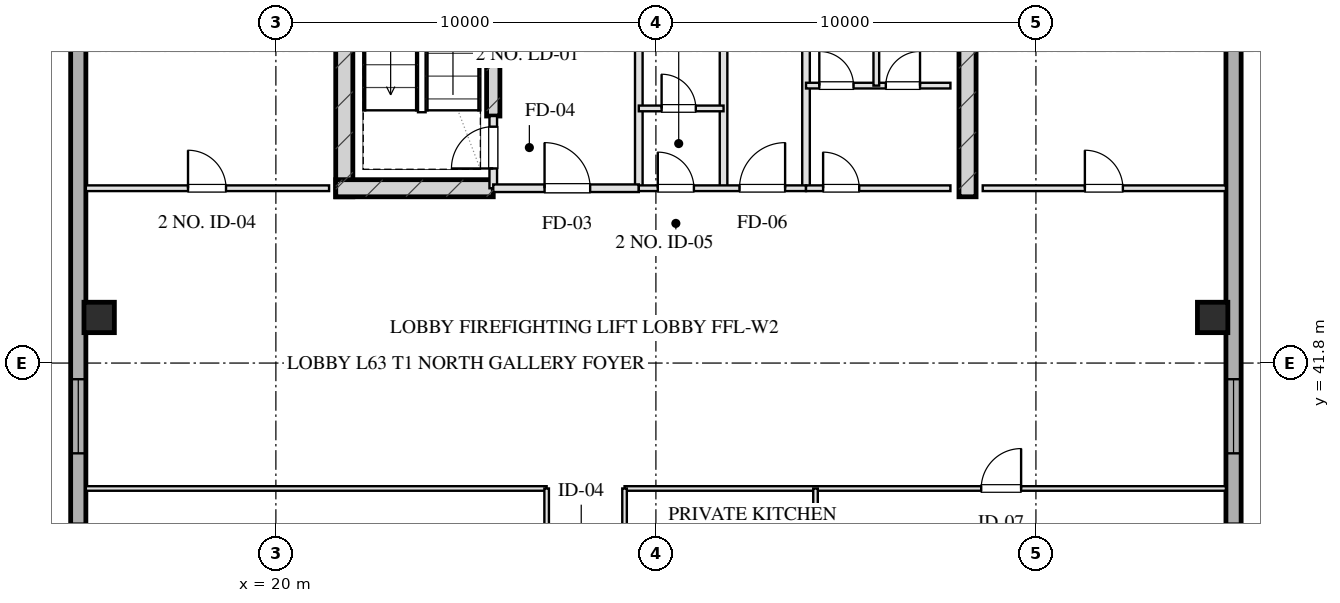
"""IFC4 building model, lengths in metres.
Left out: names, types, materials, properties, quantities, classifications, styles, units other than length and angle.
Written with IfcOpenShell. Run it as: python <this file> out.ifc"""

import sys

from ifc_helpers import new_model, si_unit, direction, frame, frame_2d, origin, origin_2d, place, context, subcontext, project, spatial, rectangle, hollow_rectangle, extrude, element, fill, save


model = new_model("IFC4")
c1 = context("Model", 3, precision=1e-05, world=origin(), true_north=direction((0.0, 1.0)))
c2 = subcontext(c1, "Body", "Model", "MODEL_VIEW")
j1 = project(units=[si_unit("LENGTHUNIT", "METRE"), si_unit("PLANEANGLEUNIT", "RADIAN")], contexts=[c1])
p1 = place(None, origin())
s1 = spatial("IfcSite", under=j1, at=p1, CompositionType="ELEMENT")
p2 = place(p1, origin())
s2 = spatial("IfcBuilding", under=s1, at=p2, CompositionType="ELEMENT")
p3 = place(p2, frame((0.0, 0.0, 234.4)))
s3 = spatial("IfcBuildingStorey", under=s2, at=p3, CompositionType="ELEMENT", Elevation=234.4)
for number, where, z_axis, x_axis in (
    (1, (21.8, 46.175, 0.0), (0.0, 0.0, 1.0), (0.0, 1.0, 0.0)),
    (2, (38.2, 46.175, 0.0), (0.0, 0.0, 1.0), (0.0, 1.0, 0.0)),
):
    element("IfcWall", number, at=place(p3, frame(where, z_axis=z_axis, x_axis=x_axis)), inside=s3, PredefinedType="SHEAR", context=c2, shape_type="SweptSolid", body=[
        extrude(rectangle(XDim=9.33, YDim=0.45, at=frame_2d((4.665, 0.0))), origin(), (0.0, 0.0, 1.0), 3.2),
    ])
p4 = place(p3, frame((25.72, 48.3, 0.0), z_axis=(0.0, 0.0, 1.0), x_axis=(0.0, 1.0, 0.0)))
e3 = element("IfcWall", 3, at=p4, inside=s3, PredefinedType="SHEAR", context=c2, shape_type="SweptSolid", body=[
    extrude(rectangle(XDim=6.98, YDim=0.35, at=frame_2d((3.49, 0.0))), origin(), (0.0, 0.0, 1.0), 3.2),
])
p5 = place(p3, frame((21.575, 46.4, 0.0), z_axis=(0.0, 0.0, 1.0), x_axis=(1.0, 0.0, 0.0)))
e4 = element("IfcWall", 4, at=p5, inside=s3, PredefinedType="SHEAR", context=c2, shape_type="SweptSolid", body=[
    extrude(rectangle(XDim=4.145, YDim=0.45, at=frame_2d((2.073, 0.0))), origin(), (0.0, 0.0, 1.0), 3.2),
])
for number, where, z_axis, x_axis in (
    (5, (15.35, 43.0, 0.0), (0.0, 0.0, 1.0), (1.0, 0.0, 0.0)),
    (6, (44.65, 43.0, 0.0), (0.0, 0.0, 1.0), (1.0, 0.0, 0.0)),
):
    element("IfcColumn", number, at=place(p3, frame(where, z_axis=z_axis, x_axis=x_axis)), inside=s3, PredefinedType="COLUMN", context=c2, shape_type="SweptSolid", body=[
        extrude(hollow_rectangle(XDim=0.8, YDim=0.8, WallThickness=0.028, at=origin_2d()), origin(), (0.0, 0.0, 1.0), 3.201),
    ])
p6 = place(p3, frame((14.8, 13.1, 0.0), z_axis=(0.0, 0.0, 1.0), x_axis=(0.0, 1.0, 0.0)))
e7 = element("IfcWall", 7, at=p6, inside=s3, PredefinedType="SOLIDWALL", context=c2, shape_type="SweptSolid", body=[
    extrude(rectangle(XDim=41.8, YDim=0.4, at=frame_2d((20.9, 0.0))), origin(), (0.0, 0.0, 1.0), 2.36),
])
p7 = place(p6, frame((13.525, 0.0, 0.75)))
e8 = element("IfcOpeningElement", 8, at=p7, cuts=e7, PredefinedType="OPENING", context=c2, shape_type="SweptSolid", body=[
    extrude(rectangle(XDim=1.95, YDim=1.21, at=frame_2d((0.975, 0.605))), frame((0.0, 0.21, 0.0), z_axis=(0.0, -1.0, 0.0), x_axis=(1.0, 0.0, 0.0)), (0.0, 0.0, 1.0), 0.42),
])
p8 = place(p6, frame((17.325, 0.0, 0.75)))
e9 = element("IfcOpeningElement", 9, at=p8, cuts=e7, PredefinedType="OPENING", context=c2, shape_type="SweptSolid", body=[
    extrude(rectangle(XDim=1.95, YDim=1.21, at=frame_2d((0.975, 0.605))), frame((0.0, 0.21, 0.0), z_axis=(0.0, -1.0, 0.0), x_axis=(1.0, 0.0, 0.0)), (0.0, 0.0, 1.0), 0.42),
])
p9 = place(p6, frame((22.525, 0.0, 0.75)))
e10 = element("IfcOpeningElement", 10, at=p9, cuts=e7, PredefinedType="OPENING", context=c2, shape_type="SweptSolid", body=[
    extrude(rectangle(XDim=1.95, YDim=1.21, at=frame_2d((0.975, 0.605))), frame((0.0, 0.21, 0.0), z_axis=(0.0, -1.0, 0.0), x_axis=(1.0, 0.0, 0.0)), (0.0, 0.0, 1.0), 0.42),
])
p10 = place(p6, frame((26.325, 0.0, 0.75)))
e11 = element("IfcOpeningElement", 11, at=p10, cuts=e7, PredefinedType="OPENING", context=c2, shape_type="SweptSolid", body=[
    extrude(rectangle(XDim=1.95, YDim=1.21, at=frame_2d((0.975, 0.605))), frame((0.0, 0.21, 0.0), z_axis=(0.0, -1.0, 0.0), x_axis=(1.0, 0.0, 0.0)), (0.0, 0.0, 1.0), 0.42),
])
p11 = place(p3, frame((45.2, 54.9, 0.0), z_axis=(0.0, 0.0, 1.0), x_axis=(0.0, -1.0, 0.0)))
e12 = element("IfcWall", 12, at=p11, inside=s3, PredefinedType="SOLIDWALL", context=c2, shape_type="SweptSolid", body=[
    extrude(rectangle(XDim=41.8, YDim=0.4, at=frame_2d((20.9, 0.0))), origin(), (0.0, 0.0, 1.0), 2.36),
])
p12 = place(p11, frame((26.325, 0.0, 0.75)))
e13 = element("IfcOpeningElement", 13, at=p12, cuts=e12, PredefinedType="OPENING", context=c2, shape_type="SweptSolid", body=[
    extrude(rectangle(XDim=1.95, YDim=1.21, at=frame_2d((0.975, 0.605))), frame((0.0, 0.21, 0.0), z_axis=(0.0, -1.0, 0.0), x_axis=(1.0, 0.0, 0.0)), (0.0, 0.0, 1.0), 0.42),
])
p13 = place(p11, frame((22.525, 0.0, 0.75)))
e14 = element("IfcOpeningElement", 14, at=p13, cuts=e12, PredefinedType="OPENING", context=c2, shape_type="SweptSolid", body=[
    extrude(rectangle(XDim=1.95, YDim=1.21, at=frame_2d((0.975, 0.605))), frame((0.0, 0.21, 0.0), z_axis=(0.0, -1.0, 0.0), x_axis=(1.0, 0.0, 0.0)), (0.0, 0.0, 1.0), 0.42),
])
p14 = place(p11, frame((17.325, 0.0, 0.75)))
e15 = element("IfcOpeningElement", 15, at=p14, cuts=e12, PredefinedType="OPENING", context=c2, shape_type="SweptSolid", body=[
    extrude(rectangle(XDim=1.95, YDim=1.21, at=frame_2d((0.975, 0.605))), frame((0.0, 0.21, 0.0), z_axis=(0.0, -1.0, 0.0), x_axis=(1.0, 0.0, 0.0)), (0.0, 0.0, 1.0), 0.42),
])
p15 = place(p11, frame((13.525, 0.0, 0.75)))
e16 = element("IfcOpeningElement", 16, at=p15, cuts=e12, PredefinedType="OPENING", context=c2, shape_type="SweptSolid", body=[
    extrude(rectangle(XDim=1.95, YDim=1.21, at=frame_2d((0.975, 0.605))), frame((0.0, 0.21, 0.0), z_axis=(0.0, -1.0, 0.0), x_axis=(1.0, 0.0, 0.0)), (0.0, 0.0, 1.0), 0.42),
])
p16 = place(p3, frame((25.72, 46.4, 0.0), z_axis=(0.0, 0.0, 1.0), x_axis=(0.0, 1.0, 0.0)))
e17 = element("IfcWall", 17, at=p16, inside=s3, PredefinedType="PARTITIONING", context=c2, shape_type="SweptSolid", body=[
    extrude(rectangle(XDim=1.9, YDim=0.2, at=frame_2d((0.95, 0.0))), origin(), (0.0, 0.0, 1.0), 2.925),
])
p17 = place(p16, frame((0.52, 0.0, 0.0)))
e18 = element("IfcOpeningElement", 18, at=p17, cuts=e17, PredefinedType="OPENING", context=c2, shape_type="SweptSolid", body=[
    extrude(rectangle(XDim=1.1, YDim=2.05, at=frame_2d((0.55, 1.025))), frame((0.0, 0.11, 0.0), z_axis=(0.0, -1.0, 0.0), x_axis=(1.0, 0.0, 0.0)), (0.0, 0.0, 1.0), 0.22),
])
p18 = place(p3, frame((29.55, 46.4, 0.0), z_axis=(0.0, 0.0, 1.0), x_axis=(0.0, 1.0, 0.0)))
e19 = element("IfcWall", 19, at=p18, inside=s3, PredefinedType="PARTITIONING", context=c2, shape_type="SweptSolid", body=[
    extrude(rectangle(XDim=8.43, YDim=0.2, at=frame_2d((4.215, 0.0))), origin(), (0.0, 0.0, 1.0), 2.925),
])
p19 = place(p3, frame((25.72, 46.4, 0.0), z_axis=(0.0, 0.0, 1.0), x_axis=(1.0, 0.0, 0.0)))
e20 = element("IfcWall", 20, at=p19, inside=s3, PredefinedType="PARTITIONING", context=c2, shape_type="SweptSolid", body=[
    extrude(rectangle(XDim=3.83, YDim=0.2, at=frame_2d((1.915, 0.0))), origin(), (0.0, 0.0, 1.0), 2.925),
])
p20 = place(p19, frame((1.35, 0.0, 0.0)))
e21 = element("IfcOpeningElement", 21, at=p20, cuts=e20, PredefinedType="OPENING", context=c2, shape_type="SweptSolid", body=[
    extrude(rectangle(XDim=1.2, YDim=2.05, at=frame_2d((0.6, 1.025))), frame((0.0, 0.11, 0.0), z_axis=(0.0, -1.0, 0.0), x_axis=(1.0, 0.0, 0.0)), (0.0, 0.0, 1.0), 0.22),
])
for number, where, z_axis, x_axis in (
    (22, (33.95, 46.4, 0.0), (0.0, 0.0, 1.0), (0.0, 1.0, 0.0)),
    (23, (31.78, 46.4, 0.0), (0.0, 0.0, 1.0), (0.0, 1.0, 0.0)),
):
    element("IfcWall", number, at=place(p3, frame(where, z_axis=z_axis, x_axis=x_axis)), inside=s3, PredefinedType="PARTITIONING", context=c2, shape_type="SweptSolid", body=[
        extrude(rectangle(XDim=8.43, YDim=0.2, at=frame_2d((4.215, 0.0))), origin(), (0.0, 0.0, 1.0), 2.925),
    ])
p21 = place(p3, frame((29.55, 46.4, 0.0), z_axis=(0.0, 0.0, 1.0), x_axis=(1.0, 0.0, 0.0)))
e24 = element("IfcWall", 24, at=p21, inside=s3, PredefinedType="PARTITIONING", context=c2, shape_type="SweptSolid", body=[
    extrude(rectangle(XDim=4.4, YDim=0.15, at=frame_2d((2.2, 0.0))), origin(), (0.0, 0.0, 1.0), 2.925),
])
p22 = place(p21, frame((0.5, 0.0, 0.0)))
e25 = element("IfcOpeningElement", 25, at=p22, cuts=e24, PredefinedType="OPENING", context=c2, shape_type="SweptSolid", body=[
    extrude(rectangle(XDim=0.95, YDim=2.05, at=frame_2d((0.475, 1.025))), frame((0.0, 0.085, 0.0), z_axis=(0.0, -1.0, 0.0), x_axis=(1.0, 0.0, 0.0)), (0.0, 0.0, 1.0), 0.17),
])
p23 = place(p21, frame((2.65, 0.0, 0.0)))
e26 = element("IfcOpeningElement", 26, at=p23, cuts=e24, PredefinedType="OPENING", context=c2, shape_type="SweptSolid", body=[
    extrude(rectangle(XDim=1.2, YDim=2.05, at=frame_2d((0.6, 1.025))), frame((0.0, 0.085, 0.0), z_axis=(0.0, -1.0, 0.0), x_axis=(1.0, 0.0, 0.0)), (0.0, 0.0, 1.0), 0.17),
])
p24 = place(p3, frame((29.55, 48.5, 0.0), z_axis=(0.0, 0.0, 1.0), x_axis=(1.0, 0.0, 0.0)))
e27 = element("IfcWall", 27, at=p24, inside=s3, PredefinedType="PARTITIONING", context=c2, shape_type="SweptSolid", body=[
    extrude(rectangle(XDim=2.23, YDim=0.15, at=frame_2d((1.115, 0.0))), origin(), (0.0, 0.0, 1.0), 2.925),
])
p25 = place(p24, frame((0.6, 0.0, 0.0)))
e28 = element("IfcOpeningElement", 28, at=p25, cuts=e27, PredefinedType="OPENING", context=c2, shape_type="SweptSolid", body=[
    extrude(rectangle(XDim=0.9, YDim=2.05, at=frame_2d((0.45, 1.025))), frame((0.0, 0.085, 0.0), z_axis=(0.0, -1.0, 0.0), x_axis=(1.0, 0.0, 0.0)), (0.0, 0.0, 1.0), 0.17),
])
p26 = place(p3, frame((33.95, 46.4, 0.0), z_axis=(0.0, 0.0, 1.0), x_axis=(1.0, 0.0, 0.0)))
e29 = element("IfcWall", 29, at=p26, inside=s3, PredefinedType="PARTITIONING", context=c2, shape_type="SweptSolid", body=[
    extrude(rectangle(XDim=3.8, YDim=0.15, at=frame_2d((1.9, 0.0))), origin(), (0.0, 0.0, 1.0), 2.925),
])
p27 = place(p26, frame((0.45, 0.0, 0.0)))
e30 = element("IfcOpeningElement", 30, at=p27, cuts=e29, PredefinedType="OPENING", context=c2, shape_type="SweptSolid", body=[
    extrude(rectangle(XDim=0.95, YDim=2.05, at=frame_2d((0.475, 1.025))), frame((0.0, 0.085, 0.0), z_axis=(0.0, -1.0, 0.0), x_axis=(1.0, 0.0, 0.0)), (0.0, 0.0, 1.0), 0.17),
])
p28 = place(p3, frame((33.95, 49.1, 0.0), z_axis=(0.0, 0.0, 1.0), x_axis=(1.0, 0.0, 0.0)))
e31 = element("IfcWall", 31, at=p28, inside=s3, PredefinedType="PARTITIONING", context=c2, shape_type="SweptSolid", body=[
    extrude(rectangle(XDim=3.8, YDim=0.15, at=frame_2d((1.9, 0.0))), origin(), (0.0, 0.0, 1.0), 2.925),
])
p29 = place(p28, frame((0.35, 0.0, 0.0)))
e32 = element("IfcOpeningElement", 32, at=p29, cuts=e31, PredefinedType="OPENING", context=c2, shape_type="SweptSolid", body=[
    extrude(rectangle(XDim=0.9, YDim=2.05, at=frame_2d((0.45, 1.025))), frame((0.0, 0.085, 0.0), z_axis=(0.0, -1.0, 0.0), x_axis=(1.0, 0.0, 0.0)), (0.0, 0.0, 1.0), 0.17),
])
p30 = place(p28, frame((2.1, 0.0, 0.0)))
e33 = element("IfcOpeningElement", 33, at=p30, cuts=e31, PredefinedType="OPENING", context=c2, shape_type="SweptSolid", body=[
    extrude(rectangle(XDim=0.9, YDim=2.05, at=frame_2d((0.45, 1.025))), frame((0.0, 0.085, 0.0), z_axis=(0.0, -1.0, 0.0), x_axis=(1.0, 0.0, 0.0)), (0.0, 0.0, 1.0), 0.17),
])
p31 = place(p3, frame((35.8, 49.1, 0.0), z_axis=(0.0, 0.0, 1.0), x_axis=(0.0, 1.0, 0.0)))
e34 = element("IfcWall", 34, at=p31, inside=s3, PredefinedType="PARTITIONING", context=c2, shape_type="SweptSolid", body=[
    extrude(rectangle(XDim=5.73, YDim=0.15, at=frame_2d((2.865, 0.0))), origin(), (0.0, 0.0, 1.0), 2.925),
])
p32 = place(p3, frame((15.0, 46.4, 0.0), z_axis=(0.0, 0.0, 1.0), x_axis=(1.0, 0.0, 0.0)))
e35 = element("IfcWall", 35, at=p32, inside=s3, PredefinedType="PARTITIONING", context=c2, shape_type="SweptSolid", body=[
    extrude(rectangle(XDim=6.4, YDim=0.15, at=frame_2d((3.2, 0.0))), origin(), (0.0, 0.0, 1.0), 2.925),
])
p33 = place(p32, frame((2.688, 0.0, 0.0)))
e36 = element("IfcOpeningElement", 36, at=p33, cuts=e35, PredefinedType="OPENING", context=c2, shape_type="SweptSolid", body=[
    extrude(rectangle(XDim=1.0, YDim=2.05, at=frame_2d((0.5, 1.025))), frame((0.0, 0.085, 0.0), z_axis=(0.0, -1.0, 0.0), x_axis=(1.0, 0.0, 0.0)), (0.0, 0.0, 1.0), 0.17),
])
p34 = place(p3, frame((38.6, 46.4, 0.0), z_axis=(0.0, 0.0, 1.0), x_axis=(1.0, 0.0, 0.0)))
e37 = element("IfcWall", 37, at=p34, inside=s3, PredefinedType="PARTITIONING", context=c2, shape_type="SweptSolid", body=[
    extrude(rectangle(XDim=6.4, YDim=0.15, at=frame_2d((3.2, 0.0))), origin(), (0.0, 0.0, 1.0), 2.925),
])
p35 = place(p34, frame((2.688, 0.0, 0.0)))
e38 = element("IfcOpeningElement", 38, at=p35, cuts=e37, PredefinedType="OPENING", context=c2, shape_type="SweptSolid", body=[
    extrude(rectangle(XDim=1.0, YDim=2.05, at=frame_2d((0.5, 1.025))), frame((0.0, 0.085, 0.0), z_axis=(0.0, -1.0, 0.0), x_axis=(1.0, 0.0, 0.0)), (0.0, 0.0, 1.0), 0.17),
])
p36 = place(p3, frame((15.0, 38.5, 0.0), z_axis=(0.0, 0.0, 1.0), x_axis=(1.0, 0.0, 0.0)))
e39 = element("IfcWall", 39, at=p36, inside=s3, PredefinedType="PARTITIONING", context=c2, shape_type="SweptSolid", body=[
    extrude(rectangle(XDim=12.125, YDim=0.12, at=frame_2d((6.062, 0.0))), origin(), (0.0, 0.0, 1.0), 2.925),
])
p37 = place(p3, frame((29.175, 38.5, 0.0), z_axis=(0.0, 0.0, 1.0), x_axis=(1.0, 0.0, 0.0)))
e40 = element("IfcWall", 40, at=p37, inside=s3, PredefinedType="PARTITIONING", context=c2, shape_type="SweptSolid", body=[
    extrude(rectangle(XDim=15.825, YDim=0.12, at=frame_2d((7.913, 0.0))), origin(), (0.0, 0.0, 1.0), 2.925),
])
p38 = place(p37, frame((9.385, 0.0, 0.0)))
e41 = element("IfcOpeningElement", 41, at=p38, cuts=e40, PredefinedType="OPENING", context=c2, shape_type="SweptSolid", body=[
    extrude(rectangle(XDim=1.05, YDim=2.05, at=frame_2d((0.525, 1.025))), frame((0.0, 0.07, 0.0), z_axis=(0.0, -1.0, 0.0), x_axis=(1.0, 0.0, 0.0)), (0.0, 0.0, 1.0), 0.14),
])
p39 = place(p3, frame((27.125, 29.5, 0.0), z_axis=(0.0, 0.0, 1.0), x_axis=(0.0, 1.0, 0.0)))
e42 = element("IfcWall", 42, at=p39, inside=s3, PredefinedType="PARTITIONING", context=c2, shape_type="SweptSolid", body=[
    extrude(rectangle(XDim=9.0, YDim=0.12, at=frame_2d((4.5, 0.0))), origin(), (0.0, 0.0, 1.0), 2.925),
])
p40 = place(p39, frame((2.335, 0.0, 0.0)))
e43 = element("IfcOpeningElement", 43, at=p40, cuts=e42, PredefinedType="OPENING", context=c2, shape_type="SweptSolid", body=[
    extrude(rectangle(XDim=0.85, YDim=2.05, at=frame_2d((0.425, 1.025))), frame((0.0, 0.07, 0.0), z_axis=(0.0, -1.0, 0.0), x_axis=(1.0, 0.0, 0.0)), (0.0, 0.0, 1.0), 0.14),
])
p41 = place(p39, frame((6.835, 0.0, 0.0)))
e44 = element("IfcOpeningElement", 44, at=p41, cuts=e42, PredefinedType="OPENING", context=c2, shape_type="SweptSolid", body=[
    extrude(rectangle(XDim=1.0, YDim=2.05, at=frame_2d((0.5, 1.025))), frame((0.0, 0.07, 0.0), z_axis=(0.0, -1.0, 0.0), x_axis=(1.0, 0.0, 0.0)), (0.0, 0.0, 1.0), 0.14),
])
p42 = place(p3, frame((29.175, 29.5, 0.0), z_axis=(0.0, 0.0, 1.0), x_axis=(0.0, 1.0, 0.0)))
e45 = element("IfcWall", 45, at=p42, inside=s3, PredefinedType="PARTITIONING", context=c2, shape_type="SweptSolid", body=[
    extrude(rectangle(XDim=9.0, YDim=0.12, at=frame_2d((4.5, 0.0))), origin(), (0.0, 0.0, 1.0), 2.925),
])
p43 = place(p42, frame((1.165, 0.0, 0.0)))
e46 = element("IfcOpeningElement", 46, at=p43, cuts=e45, PredefinedType="OPENING", context=c2, shape_type="SweptSolid", body=[
    extrude(rectangle(XDim=1.0, YDim=2.05, at=frame_2d((0.5, 1.025))), frame((0.0, 0.07, 0.0), z_axis=(0.0, -1.0, 0.0), x_axis=(1.0, 0.0, 0.0)), (0.0, 0.0, 1.0), 0.14),
])
p44 = place(p42, frame((4.0, 0.0, 0.0)))
e47 = element("IfcOpeningElement", 47, at=p44, cuts=e45, PredefinedType="OPENING", context=c2, shape_type="SweptSolid", body=[
    extrude(rectangle(XDim=1.0, YDim=2.05, at=frame_2d((0.5, 1.025))), frame((0.0, 0.07, 0.0), z_axis=(0.0, -1.0, 0.0), x_axis=(1.0, 0.0, 0.0)), (0.0, 0.0, 1.0), 0.14),
])
p45 = place(p42, frame((6.835, 0.0, 0.0)))
e48 = element("IfcOpeningElement", 48, at=p45, cuts=e45, PredefinedType="OPENING", context=c2, shape_type="SweptSolid", body=[
    extrude(rectangle(XDim=1.0, YDim=2.05, at=frame_2d((0.5, 1.025))), frame((0.0, 0.07, 0.0), z_axis=(0.0, -1.0, 0.0), x_axis=(1.0, 0.0, 0.0)), (0.0, 0.0, 1.0), 0.14),
])
p46 = place(p3, frame((34.2, 35.17, 0.0), z_axis=(0.0, 0.0, 1.0), x_axis=(0.0, 1.0, 0.0)))
e49 = element("IfcWall", 49, at=p46, inside=s3, PredefinedType="PARTITIONING", context=c2, shape_type="SweptSolid", body=[
    extrude(rectangle(XDim=3.33, YDim=0.12, at=frame_2d((1.665, 0.0))), origin(), (0.0, 0.0, 1.0), 2.925),
])
p47 = place(p10, origin())
e50 = element("IfcWindow", 50, at=p47, inside=s3, PartitioningType="TRIPLE_PANEL_VERTICAL", PredefinedType="WINDOW", context=c2, shape_type="SweptSolid", body=[
    extrude(rectangle(XDim=1.95, YDim=1.21, at=frame_2d((0.975, 0.605))), frame((0.0, 0.03, 0.0), z_axis=(0.0, -1.0, 0.0), x_axis=(1.0, 0.0, 0.0)), (0.0, 0.0, 1.0), 0.06),
])
fill(e11, e50)
p48 = place(p15, origin())
e51 = element("IfcWindow", 51, at=p48, inside=s3, PartitioningType="TRIPLE_PANEL_VERTICAL", PredefinedType="WINDOW", context=c2, shape_type="SweptSolid", body=[
    extrude(rectangle(XDim=1.95, YDim=1.21, at=frame_2d((0.975, 0.605))), frame((0.0, 0.03, 0.0), z_axis=(0.0, -1.0, 0.0), x_axis=(1.0, 0.0, 0.0)), (0.0, 0.0, 1.0), 0.06),
])
fill(e16, e51)
p49 = place(p17, origin())
e52 = element("IfcDoor", 52, at=p49, inside=s3, OperationType="SINGLE_SWING_LEFT", PredefinedType="DOOR", context=c2, shape_type="SweptSolid", body=[
    extrude(rectangle(XDim=1.1, YDim=2.05, at=frame_2d((0.55, 1.025))), frame((0.0, 0.025, 0.0), z_axis=(0.0, -1.0, 0.0), x_axis=(1.0, 0.0, 0.0)), (0.0, 0.0, 1.0), 0.05),
])
fill(e18, e52)
p50 = place(p20, origin())
e53 = element("IfcDoor", 53, at=p50, inside=s3, OperationType="SINGLE_SWING_LEFT", PredefinedType="DOOR", context=c2, shape_type="SweptSolid", body=[
    extrude(rectangle(XDim=1.2, YDim=2.05, at=frame_2d((0.6, 1.025))), frame((0.0, 0.025, 0.0), z_axis=(0.0, -1.0, 0.0), x_axis=(1.0, 0.0, 0.0)), (0.0, 0.0, 1.0), 0.05),
])
fill(e21, e53)
p51 = place(p22, origin())
e54 = element("IfcDoor", 54, at=p51, inside=s3, OperationType="SINGLE_SWING_LEFT", PredefinedType="DOOR", context=c2, shape_type="SweptSolid", body=[
    extrude(rectangle(XDim=0.95, YDim=2.05, at=frame_2d((0.475, 1.025))), frame((0.0, 0.025, 0.0), z_axis=(0.0, -1.0, 0.0), x_axis=(1.0, 0.0, 0.0)), (0.0, 0.0, 1.0), 0.05),
])
fill(e25, e54)
p52 = place(p23, origin())
e55 = element("IfcDoor", 55, at=p52, inside=s3, OperationType="SINGLE_SWING_RIGHT", PredefinedType="DOOR", context=c2, shape_type="SweptSolid", body=[
    extrude(rectangle(XDim=1.2, YDim=2.05, at=frame_2d((0.6, 1.025))), frame((0.0, 0.025, 0.0), z_axis=(0.0, -1.0, 0.0), x_axis=(1.0, 0.0, 0.0)), (0.0, 0.0, 1.0), 0.05),
])
fill(e26, e55)
p53 = place(p25, origin())
e56 = element("IfcDoor", 56, at=p53, inside=s3, OperationType="SINGLE_SWING_LEFT", PredefinedType="DOOR", context=c2, shape_type="SweptSolid", body=[
    extrude(rectangle(XDim=0.9, YDim=2.05, at=frame_2d((0.45, 1.025))), frame((0.0, 0.025, 0.0), z_axis=(0.0, -1.0, 0.0), x_axis=(1.0, 0.0, 0.0)), (0.0, 0.0, 1.0), 0.05),
])
fill(e28, e56)
p54 = place(p27, origin())
e57 = element("IfcDoor", 57, at=p54, inside=s3, OperationType="SINGLE_SWING_LEFT", PredefinedType="DOOR", context=c2, shape_type="SweptSolid", body=[
    extrude(rectangle(XDim=0.95, YDim=2.05, at=frame_2d((0.475, 1.025))), frame((0.0, 0.025, 0.0), z_axis=(0.0, -1.0, 0.0), x_axis=(1.0, 0.0, 0.0)), (0.0, 0.0, 1.0), 0.05),
])
fill(e30, e57)
p55 = place(p29, origin())
e58 = element("IfcDoor", 58, at=p55, inside=s3, OperationType="SINGLE_SWING_LEFT", PredefinedType="DOOR", context=c2, shape_type="SweptSolid", body=[
    extrude(rectangle(XDim=0.9, YDim=2.05, at=frame_2d((0.45, 1.025))), frame((0.0, 0.025, 0.0), z_axis=(0.0, -1.0, 0.0), x_axis=(1.0, 0.0, 0.0)), (0.0, 0.0, 1.0), 0.05),
])
fill(e32, e58)
p56 = place(p30, origin())
e59 = element("IfcDoor", 59, at=p56, inside=s3, OperationType="SINGLE_SWING_RIGHT", PredefinedType="DOOR", context=c2, shape_type="SweptSolid", body=[
    extrude(rectangle(XDim=0.9, YDim=2.05, at=frame_2d((0.45, 1.025))), frame((0.0, 0.025, 0.0), z_axis=(0.0, -1.0, 0.0), x_axis=(1.0, 0.0, 0.0)), (0.0, 0.0, 1.0), 0.05),
])
fill(e33, e59)
p57 = place(p33, origin())
e60 = element("IfcDoor", 60, at=p57, inside=s3, OperationType="SINGLE_SWING_LEFT", PredefinedType="DOOR", context=c2, shape_type="SweptSolid", body=[
    extrude(rectangle(XDim=1.0, YDim=2.05, at=frame_2d((0.5, 1.025))), frame((0.0, 0.025, 0.0), z_axis=(0.0, -1.0, 0.0), x_axis=(1.0, 0.0, 0.0)), (0.0, 0.0, 1.0), 0.05),
])
fill(e36, e60)
p58 = place(p35, origin())
e61 = element("IfcDoor", 61, at=p58, inside=s3, OperationType="SINGLE_SWING_LEFT", PredefinedType="DOOR", context=c2, shape_type="SweptSolid", body=[
    extrude(rectangle(XDim=1.0, YDim=2.05, at=frame_2d((0.5, 1.025))), frame((0.0, 0.025, 0.0), z_axis=(0.0, -1.0, 0.0), x_axis=(1.0, 0.0, 0.0)), (0.0, 0.0, 1.0), 0.05),
])
fill(e38, e61)
p59 = place(p38, origin())
e62 = element("IfcDoor", 62, at=p59, inside=s3, OperationType="SINGLE_SWING_RIGHT", PredefinedType="DOOR", context=c2, shape_type="SweptSolid", body=[
    extrude(rectangle(XDim=1.05, YDim=2.05, at=frame_2d((0.525, 1.025))), frame((0.0, 0.025, 0.0), z_axis=(0.0, -1.0, 0.0), x_axis=(1.0, 0.0, 0.0)), (0.0, 0.0, 1.0), 0.05),
])
fill(e41, e62)
save(model, sys.argv[1])
